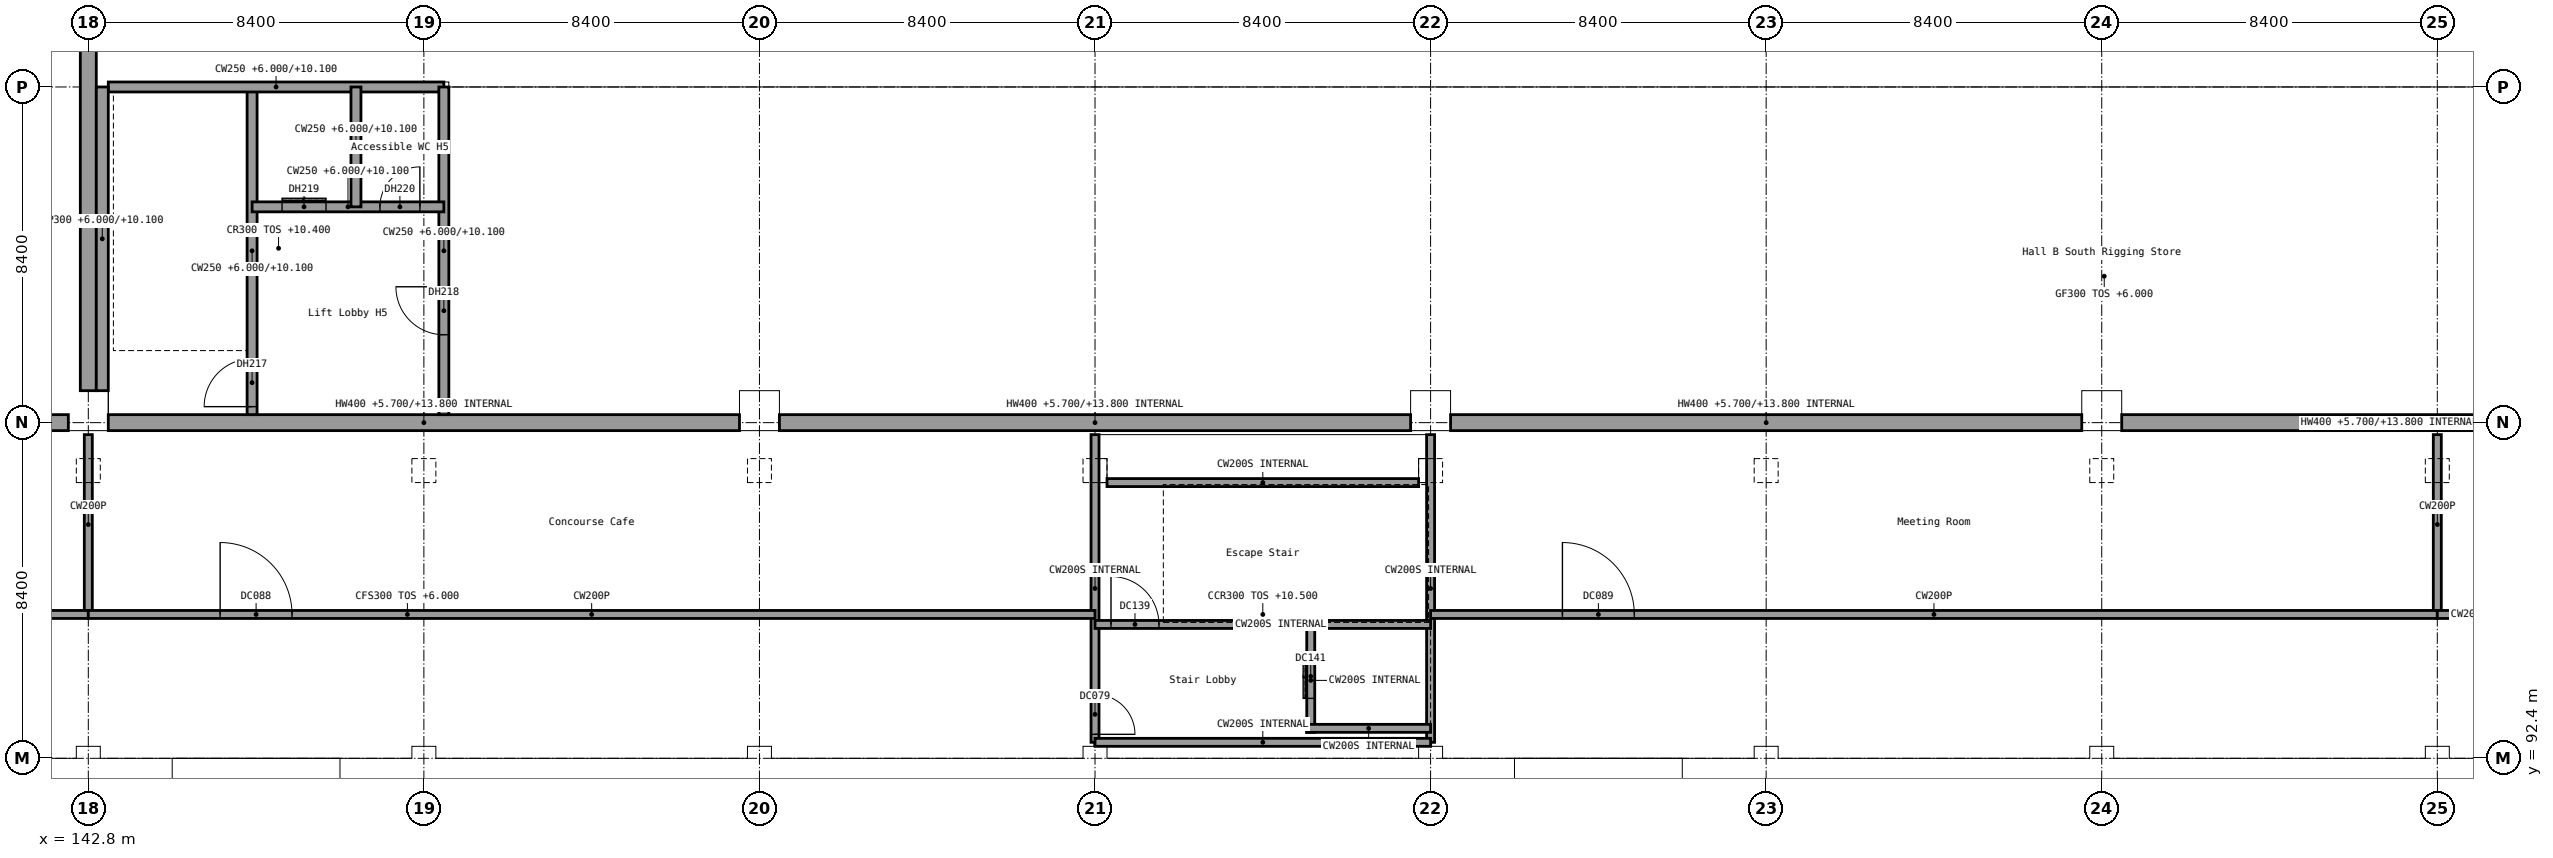
"""IFC4 building model, lengths in metres.
Left out: names, types, materials, properties, quantities, classifications, styles, units other than length and angle.
Written with IfcOpenShell. Run it as: python <this file> out.ifc"""

import sys

from ifc_helpers import new_model, si_unit, direction, frame, frame_2d, origin, origin_2d, place, context, subcontext, project, spatial, rectangle, extrude, element, fill, save


model = new_model("IFC4")
c1 = context("Model", 3, precision=1e-05, world=origin(), true_north=direction((0.0, 1.0)))
c2 = subcontext(c1, "Body", "Model", "MODEL_VIEW")
j1 = project(units=[si_unit("LENGTHUNIT", "METRE"), si_unit("PLANEANGLEUNIT", "RADIAN")], contexts=[c1])
p1 = place(None, origin())
s1 = spatial("IfcSite", under=j1, at=p1, CompositionType="ELEMENT")
p2 = place(p1, origin())
s2 = spatial("IfcBuilding", under=s1, at=p2, CompositionType="ELEMENT")
p3 = place(p2, frame((0.0, 0.0, 6.0)))
s3 = spatial("IfcBuildingStorey", under=s2, at=p3, CompositionType="ELEMENT", Elevation=6.0)
for number, where, z_axis, x_axis in (
    (1, (142.8, 100.8, 0.0), (0.0, 0.0, 1.0), (1.0, 0.0, 0.0)),
    (2, (159.6, 100.8, 0.0), (0.0, 0.0, 1.0), (1.0, 0.0, 0.0)),
    (3, (176.4, 100.8, 0.0), (0.0, 0.0, 1.0), (1.0, 0.0, 0.0)),
    (4, (193.2, 100.8, 0.0), (0.0, 0.0, 1.0), (1.0, 0.0, 0.0)),
):
    element("IfcColumn", number, at=place(p3, frame(where, z_axis=z_axis, x_axis=x_axis)), inside=s3, PredefinedType="COLUMN", context=c2, shape_type="SweptSolid", body=[
        extrude(rectangle(XDim=1.0, YDim=1.6, at=origin_2d()), origin(), (0.0, 0.0, 1.0), 4.5),
    ])
p4 = place(p3, frame((143.3, 100.8, -0.3), z_axis=(0.0, 0.0, 1.0), x_axis=(1.0, 0.0, 0.0)))
e5 = element("IfcWall", 5, at=p4, inside=s3, PredefinedType="STANDARD", context=c2, shape_type="SweptSolid", body=[
    extrude(rectangle(XDim=15.8, YDim=0.4, at=frame_2d((7.9, 0.0))), origin(), (0.0, 0.0, 1.0), 8.1),
])
p5 = place(p3, frame((160.1, 100.8, -0.3), z_axis=(0.0, 0.0, 1.0), x_axis=(1.0, 0.0, 0.0)))
e6 = element("IfcWall", 6, at=p5, inside=s3, PredefinedType="STANDARD", context=c2, shape_type="SweptSolid", body=[
    extrude(rectangle(XDim=15.8, YDim=0.4, at=frame_2d((7.9, 0.0))), origin(), (0.0, 0.0, 1.0), 8.1),
])
for number, where, z_axis, x_axis in (
    (7, (176.9, 100.8, -0.3), (0.0, 0.0, 1.0), (1.0, 0.0, 0.0)),
    (8, (193.7, 100.8, -0.3), (0.0, 0.0, 1.0), (1.0, 0.0, 0.0)),
):
    element("IfcWall", number, at=place(p3, frame(where, z_axis=z_axis, x_axis=x_axis)), inside=s3, PredefinedType="STANDARD", context=c2, shape_type="SweptSolid", body=[
        extrude(rectangle(XDim=15.8, YDim=0.4, at=frame_2d((7.9, 0.0))), origin(), (0.0, 0.0, 1.0), 8.1),
    ])
p6 = place(p3, frame((142.8, 101.6, 0.0), z_axis=(0.0, 0.0, 1.0), x_axis=(0.0, 1.0, 0.0)))
e9 = element("IfcWall", 9, at=p6, inside=s3, PredefinedType="SHEAR", context=c2, shape_type="SweptSolid", body=[
    extrude(rectangle(XDim=99.2, YDim=0.4, at=frame_2d((49.6, 0.0))), origin(), (0.0, 0.0, 1.0), 5.0),
])
p7 = place(p3, frame((126.5, 100.8, -0.3), z_axis=(0.0, 0.0, 1.0), x_axis=(1.0, 0.0, 0.0)))
e10 = element("IfcWall", 10, at=p7, inside=s3, PredefinedType="SHEAR", context=c2, shape_type="SweptSolid", body=[
    extrude(rectangle(XDim=15.8, YDim=0.4, at=frame_2d((7.9, 0.0))), origin(), (0.0, 0.0, 1.0), 4.9),
])
p8 = place(p7, frame((6.35, 0.0, 0.3)))
e11 = element("IfcOpeningElement", 11, at=p8, cuts=e10, PredefinedType="OPENING", context=c2, shape_type="SweptSolid", body=[
    extrude(rectangle(XDim=1.2, YDim=2.1, at=frame_2d((0.6, 1.05))), frame((0.0, 0.2, 0.0), z_axis=(0.0, -1.0, 0.0), x_axis=(1.0, 0.0, 0.0)), (0.0, 0.0, 1.0), 0.4),
])
p9 = place(p3, frame((146.9, 101.0, 0.0), z_axis=(0.0, 0.0, 1.0), x_axis=(0.0, 1.0, 0.0)))
e12 = element("IfcWall", 12, at=p9, inside=s3, PredefinedType="SHEAR", context=c2, shape_type="SweptSolid", body=[
    extrude(rectangle(XDim=8.2, YDim=0.25, at=frame_2d((4.1, 0.0))), origin(), (0.0, 0.0, 1.0), 4.1),
])
p10 = place(p9, frame((0.2, 0.0, 0.0)))
e13 = element("IfcOpeningElement", 13, at=p10, cuts=e12, PredefinedType="OPENING", context=c2, shape_type="SweptSolid", body=[
    extrude(rectangle(XDim=1.2, YDim=2.1, at=frame_2d((0.6, 1.05))), frame((0.0, 0.125, 0.0), z_axis=(0.0, -1.0, 0.0), x_axis=(1.0, 0.0, 0.0)), (0.0, 0.0, 1.0), 0.25),
])
p11 = place(p3, frame((143.3, 109.2, 0.0), z_axis=(0.0, 0.0, 1.0), x_axis=(1.0, 0.0, 0.0)))
e14 = element("IfcWall", 14, at=p11, inside=s3, PredefinedType="SHEAR", context=c2, shape_type="SweptSolid", body=[
    extrude(rectangle(XDim=8.4, YDim=0.25, at=frame_2d((4.2, 0.0))), origin(), (0.0, 0.0, 1.0), 4.1),
])
p12 = place(p3, frame((151.7, 101.0, 0.0), z_axis=(0.0, 0.0, 1.0), x_axis=(0.0, 1.0, 0.0)))
e15 = element("IfcWall", 15, at=p12, inside=s3, PredefinedType="SHEAR", context=c2, shape_type="SweptSolid", body=[
    extrude(rectangle(XDim=8.2, YDim=0.25, at=frame_2d((4.1, 0.0))), origin(), (0.0, 0.0, 1.0), 4.1),
])
p13 = place(p12, frame((2.0, 0.0, 0.0)))
e16 = element("IfcOpeningElement", 16, at=p13, cuts=e15, PredefinedType="OPENING", context=c2, shape_type="SweptSolid", body=[
    extrude(rectangle(XDim=1.2, YDim=2.1, at=frame_2d((0.6, 1.05))), frame((0.0, 0.125, 0.0), z_axis=(0.0, -1.0, 0.0), x_axis=(1.0, 0.0, 0.0)), (0.0, 0.0, 1.0), 0.25),
])
p14 = place(p3, frame((146.9, 106.2, 0.0), z_axis=(0.0, 0.0, 1.0), x_axis=(1.0, 0.0, 0.0)))
e17 = element("IfcWall", 17, at=p14, inside=s3, PredefinedType="SHEAR", context=c2, shape_type="SweptSolid", body=[
    extrude(rectangle(XDim=4.8, YDim=0.25, at=frame_2d((2.4, 0.0))), origin(), (0.0, 0.0, 1.0), 4.1),
])
p15 = place(p14, frame((0.75, 0.0, 0.0)))
e18 = element("IfcOpeningElement", 18, at=p15, cuts=e17, PredefinedType="OPENING", context=c2, shape_type="SweptSolid", body=[
    extrude(rectangle(XDim=1.1, YDim=2.1, at=frame_2d((0.55, 1.05))), frame((0.0, 0.125, 0.0), z_axis=(0.0, -1.0, 0.0), x_axis=(1.0, 0.0, 0.0)), (0.0, 0.0, 1.0), 0.25),
])
p16 = place(p14, frame((3.2, 0.0, 0.0)))
e19 = element("IfcOpeningElement", 19, at=p16, cuts=e17, PredefinedType="OPENING", context=c2, shape_type="SweptSolid", body=[
    extrude(rectangle(XDim=1.0, YDim=2.1, at=frame_2d((0.5, 1.05))), frame((0.0, 0.125, 0.0), z_axis=(0.0, -1.0, 0.0), x_axis=(1.0, 0.0, 0.0)), (0.0, 0.0, 1.0), 0.25),
])
p17 = place(p3, frame((149.5, 106.2, 0.0), z_axis=(0.0, 0.0, 1.0), x_axis=(0.0, 1.0, 0.0)))
e20 = element("IfcWall", 20, at=p17, inside=s3, PredefinedType="SHEAR", context=c2, shape_type="SweptSolid", body=[
    extrude(rectangle(XDim=3.0, YDim=0.25, at=frame_2d((1.5, 0.0))), origin(), (0.0, 0.0, 1.0), 4.1),
])
p18 = place(p3, frame((143.15, 101.6, 0.0), z_axis=(0.0, 0.0, 1.0), x_axis=(0.0, 1.0, 0.0)))
e21 = element("IfcWall", 21, at=p18, inside=s3, PredefinedType="SHEAR", context=c2, shape_type="SweptSolid", body=[
    extrude(rectangle(XDim=7.6, YDim=0.3, at=frame_2d((3.8, 0.0))), origin(), (0.0, 0.0, 1.0), 4.1),
])
for number, where, z_axis, x_axis in (
    (22, (142.8, 99.6, 0.0), (0.0, 0.0, 1.0), (1.0, 0.0, 0.0)),
    (23, (151.2, 99.6, 0.0), (0.0, 0.0, 1.0), (1.0, 0.0, 0.0)),
    (24, (159.6, 99.6, 0.0), (0.0, 0.0, 1.0), (1.0, 0.0, 0.0)),
    (25, (168.0, 99.6, 0.0), (0.0, 0.0, 1.0), (1.0, 0.0, 0.0)),
    (26, (176.4, 99.6, 0.0), (0.0, 0.0, 1.0), (1.0, 0.0, 0.0)),
    (27, (184.8, 99.6, 0.0), (0.0, 0.0, 1.0), (1.0, 0.0, 0.0)),
    (28, (193.2, 99.6, 0.0), (0.0, 0.0, 1.0), (1.0, 0.0, 0.0)),
    (29, (201.6, 99.6, 0.0), (0.0, 0.0, 1.0), (1.0, 0.0, 0.0)),
):
    element("IfcColumn", number, at=place(p3, frame(where, z_axis=z_axis, x_axis=x_axis)), inside=s3, PredefinedType="COLUMN", context=c2, shape_type="SweptSolid", body=[
        extrude(rectangle(XDim=0.6, YDim=0.6, at=origin_2d()), origin(), (0.0, 0.0, 1.0), 4.5),
    ])
p19 = place(p3, frame((142.8, 100.5, 0.0), z_axis=(0.0, 0.0, 1.0), x_axis=(0.0, -1.0, 0.0)))
e30 = element("IfcWall", 30, at=p19, inside=s3, PredefinedType="PARTITIONING", context=c2, shape_type="SweptSolid", body=[
    extrude(rectangle(XDim=4.5, YDim=0.2, at=frame_2d((2.25, 0.0))), origin(), (0.0, 0.0, 1.0), 4.5),
])
p20 = place(p3, frame((168.0, 100.5, 0.0), z_axis=(0.0, 0.0, 1.0), x_axis=(0.0, -1.0, 0.0)))
e31 = element("IfcWall", 31, at=p20, inside=s3, PredefinedType="SOLIDWALL", context=c2, shape_type="SweptSolid", body=[
    extrude(rectangle(XDim=7.7, YDim=0.2, at=frame_2d((3.85, 0.0))), origin(), (0.0, 0.0, 1.0), 4.2),
])
p21 = place(p20, frame((6.5, 0.0, 0.0)))
e32 = element("IfcOpeningElement", 32, at=p21, cuts=e31, PredefinedType="OPENING", context=c2, shape_type="SweptSolid", body=[
    extrude(rectangle(XDim=1.0, YDim=2.4, at=frame_2d((0.5, 1.2))), frame((0.0, 0.1, 0.0), z_axis=(0.0, -1.0, 0.0), x_axis=(1.0, 0.0, 0.0)), (0.0, 0.0, 1.0), 0.2),
])
p22 = place(p3, frame((176.4, 100.5, 0.0), z_axis=(0.0, 0.0, 1.0), x_axis=(0.0, -1.0, 0.0)))
e33 = element("IfcWall", 33, at=p22, inside=s3, PredefinedType="SOLIDWALL", context=c2, shape_type="SweptSolid", body=[
    extrude(rectangle(XDim=7.7, YDim=0.2, at=frame_2d((3.85, 0.0))), origin(), (0.0, 0.0, 1.0), 4.2),
])
p23 = place(p3, frame((201.6, 100.5, 0.0), z_axis=(0.0, 0.0, 1.0), x_axis=(0.0, -1.0, 0.0)))
e34 = element("IfcWall", 34, at=p23, inside=s3, PredefinedType="PARTITIONING", context=c2, shape_type="SweptSolid", body=[
    extrude(rectangle(XDim=4.5, YDim=0.2, at=frame_2d((2.25, 0.0))), origin(), (0.0, 0.0, 1.0), 4.5),
])
p24 = place(p3, frame((126.0, 96.0, 0.0), z_axis=(0.0, 0.0, 1.0), x_axis=(1.0, 0.0, 0.0)))
e35 = element("IfcWall", 35, at=p24, inside=s3, PredefinedType="PARTITIONING", context=c2, shape_type="SweptSolid", body=[
    extrude(rectangle(XDim=16.8, YDim=0.2, at=frame_2d((8.4, 0.0))), origin(), (0.0, 0.0, 1.0), 4.5),
])
p25 = place(p24, frame((3.3, 0.0, 0.0)))
e36 = element("IfcOpeningElement", 36, at=p25, cuts=e35, PredefinedType="OPENING", context=c2, shape_type="SweptSolid", body=[
    extrude(rectangle(XDim=1.8, YDim=2.4, at=frame_2d((0.9, 1.2))), frame((0.0, 0.1, 0.0), z_axis=(0.0, -1.0, 0.0), x_axis=(1.0, 0.0, 0.0)), (0.0, 0.0, 1.0), 0.2),
])
p26 = place(p3, frame((142.8, 96.0, 0.0), z_axis=(0.0, 0.0, 1.0), x_axis=(1.0, 0.0, 0.0)))
e37 = element("IfcWall", 37, at=p26, inside=s3, PredefinedType="PARTITIONING", context=c2, shape_type="SweptSolid", body=[
    extrude(rectangle(XDim=25.2, YDim=0.2, at=frame_2d((12.6, 0.0))), origin(), (0.0, 0.0, 1.0), 4.5),
])
p27 = place(p26, frame((3.3, 0.0, 0.0)))
e38 = element("IfcOpeningElement", 38, at=p27, cuts=e37, PredefinedType="OPENING", context=c2, shape_type="SweptSolid", body=[
    extrude(rectangle(XDim=1.8, YDim=2.4, at=frame_2d((0.9, 1.2))), frame((0.0, 0.1, 0.0), z_axis=(0.0, -1.0, 0.0), x_axis=(1.0, 0.0, 0.0)), (0.0, 0.0, 1.0), 0.2),
])
p28 = place(p3, frame((176.4, 96.0, 0.0), z_axis=(0.0, 0.0, 1.0), x_axis=(1.0, 0.0, 0.0)))
e39 = element("IfcWall", 39, at=p28, inside=s3, PredefinedType="PARTITIONING", context=c2, shape_type="SweptSolid", body=[
    extrude(rectangle(XDim=25.2, YDim=0.2, at=frame_2d((12.6, 0.0))), origin(), (0.0, 0.0, 1.0), 4.5),
])
p29 = place(p28, frame((3.3, 0.0, 0.0)))
e40 = element("IfcOpeningElement", 40, at=p29, cuts=e39, PredefinedType="OPENING", context=c2, shape_type="SweptSolid", body=[
    extrude(rectangle(XDim=1.8, YDim=2.4, at=frame_2d((0.9, 1.2))), frame((0.0, 0.1, 0.0), z_axis=(0.0, -1.0, 0.0), x_axis=(1.0, 0.0, 0.0)), (0.0, 0.0, 1.0), 0.2),
])
p30 = place(p3, frame((201.6, 96.0, 0.0), z_axis=(0.0, 0.0, 1.0), x_axis=(1.0, 0.0, 0.0)))
e41 = element("IfcWall", 41, at=p30, inside=s3, PredefinedType="PARTITIONING", context=c2, shape_type="SweptSolid", body=[
    extrude(rectangle(XDim=16.8, YDim=0.2, at=frame_2d((8.4, 0.0))), origin(), (0.0, 0.0, 1.0), 4.5),
])
p31 = place(p30, frame((3.3, 0.0, 0.0)))
e42 = element("IfcOpeningElement", 42, at=p31, cuts=e41, PredefinedType="OPENING", context=c2, shape_type="SweptSolid", body=[
    extrude(rectangle(XDim=1.8, YDim=2.4, at=frame_2d((0.9, 1.2))), frame((0.0, 0.1, 0.0), z_axis=(0.0, -1.0, 0.0), x_axis=(1.0, 0.0, 0.0)), (0.0, 0.0, 1.0), 0.2),
])
p32 = place(p3, frame((168.0, 92.8, 0.0), z_axis=(0.0, 0.0, 1.0), x_axis=(1.0, 0.0, 0.0)))
e43 = element("IfcWall", 43, at=p32, inside=s3, PredefinedType="SOLIDWALL", context=c2, shape_type="SweptSolid", body=[
    extrude(rectangle(XDim=8.4, YDim=0.2, at=frame_2d((4.2, 0.0))), origin(), (0.0, 0.0, 1.0), 4.2),
])
p33 = place(p3, frame((168.3, 99.3, 0.0), z_axis=(0.0, 0.0, 1.0), x_axis=(1.0, 0.0, 0.0)))
e44 = element("IfcWall", 44, at=p33, inside=s3, PredefinedType="SOLIDWALL", context=c2, shape_type="SweptSolid", body=[
    extrude(rectangle(XDim=7.8, YDim=0.2, at=frame_2d((3.9, 0.0))), origin(), (0.0, 0.0, 1.0), 4.2),
])
p34 = place(p3, frame((168.0, 95.75, 0.0), z_axis=(0.0, 0.0, 1.0), x_axis=(1.0, 0.0, 0.0)))
e45 = element("IfcWall", 45, at=p34, inside=s3, PredefinedType="SOLIDWALL", context=c2, shape_type="SweptSolid", body=[
    extrude(rectangle(XDim=8.4, YDim=0.2, at=frame_2d((4.2, 0.0))), origin(), (0.0, 0.0, 1.0), 4.2),
])
p35 = place(p34, frame((0.4, 0.0, 0.0)))
e46 = element("IfcOpeningElement", 46, at=p35, cuts=e45, PredefinedType="OPENING", context=c2, shape_type="SweptSolid", body=[
    extrude(rectangle(XDim=1.2, YDim=2.4, at=frame_2d((0.6, 1.2))), frame((0.0, 0.1, 0.0), z_axis=(0.0, -1.0, 0.0), x_axis=(1.0, 0.0, 0.0)), (0.0, 0.0, 1.0), 0.2),
])
p36 = place(p3, frame((173.4, 93.05, 0.0), z_axis=(0.0, 0.0, 1.0), x_axis=(0.0, 1.0, 0.0)))
e47 = element("IfcWall", 47, at=p36, inside=s3, PredefinedType="SOLIDWALL", context=c2, shape_type="SweptSolid", body=[
    extrude(rectangle(XDim=2.6, YDim=0.2, at=frame_2d((1.3, 0.0))), origin(), (0.0, 0.0, 1.0), 4.2),
])
p37 = place(p36, frame((0.85, 0.0, 0.0)))
e48 = element("IfcOpeningElement", 48, at=p37, cuts=e47, PredefinedType="OPENING", context=c2, shape_type="SweptSolid", body=[
    extrude(rectangle(XDim=1.1, YDim=2.1, at=frame_2d((0.55, 1.05))), frame((0.0, 0.1, 0.0), z_axis=(0.0, -1.0, 0.0), x_axis=(1.0, 0.0, 0.0)), (0.0, 0.0, 1.0), 0.2),
])
p38 = place(p3, frame((173.3, 93.15, 0.0), z_axis=(0.0, 0.0, 1.0), x_axis=(1.0, 0.0, 0.0)))
e49 = element("IfcWall", 49, at=p38, inside=s3, PredefinedType="SOLIDWALL", context=c2, shape_type="SweptSolid", body=[
    extrude(rectangle(XDim=3.1, YDim=0.2, at=frame_2d((1.55, 0.0))), origin(), (0.0, 0.0, 1.0), 4.2),
])
p39 = place(p10, origin())
e50 = element("IfcDoor", 50, at=p39, inside=s3, OperationType="SINGLE_SWING_LEFT", PredefinedType="DOOR", context=c2, shape_type="SweptSolid", body=[
    extrude(rectangle(XDim=1.2, YDim=2.1, at=frame_2d((0.6, 1.05))), frame((0.0, 0.025, 0.0), z_axis=(0.0, -1.0, 0.0), x_axis=(1.0, 0.0, 0.0)), (0.0, 0.0, 1.0), 0.05),
])
fill(e13, e50)
p40 = place(p13, origin())
e51 = element("IfcDoor", 51, at=p40, inside=s3, OperationType="SINGLE_SWING_LEFT", PredefinedType="DOOR", context=c2, shape_type="SweptSolid", body=[
    extrude(rectangle(XDim=1.2, YDim=2.1, at=frame_2d((0.6, 1.05))), frame((0.0, 0.025, 0.0), z_axis=(0.0, -1.0, 0.0), x_axis=(1.0, 0.0, 0.0)), (0.0, 0.0, 1.0), 0.05),
])
fill(e16, e51)
p41 = place(p15, origin())
e52 = element("IfcDoor", 52, at=p41, inside=s3, OperationType="DOUBLE_DOOR_SLIDING", PredefinedType="DOOR", context=c2, shape_type="SweptSolid", body=[
    extrude(rectangle(XDim=1.1, YDim=2.1, at=frame_2d((0.55, 1.05))), frame((0.0, 0.025, 0.0), z_axis=(0.0, -1.0, 0.0), x_axis=(1.0, 0.0, 0.0)), (0.0, 0.0, 1.0), 0.05),
])
fill(e18, e52)
p42 = place(p16, origin())
e53 = element("IfcDoor", 53, at=p42, inside=s3, OperationType="SINGLE_SWING_RIGHT", PredefinedType="DOOR", context=c2, shape_type="SweptSolid", body=[
    extrude(rectangle(XDim=1.0, YDim=2.1, at=frame_2d((0.5, 1.05))), frame((0.0, 0.025, 0.0), z_axis=(0.0, -1.0, 0.0), x_axis=(1.0, 0.0, 0.0)), (0.0, 0.0, 1.0), 0.05),
])
fill(e19, e53)
p43 = place(p21, origin())
e54 = element("IfcDoor", 54, at=p43, inside=s3, OperationType="SINGLE_SWING_RIGHT", PredefinedType="DOOR", context=c2, shape_type="SweptSolid", body=[
    extrude(rectangle(XDim=1.0, YDim=2.4, at=frame_2d((0.5, 1.2))), frame((0.0, 0.025, 0.0), z_axis=(0.0, -1.0, 0.0), x_axis=(1.0, 0.0, 0.0)), (0.0, 0.0, 1.0), 0.05),
])
fill(e32, e54)
p44 = place(p27, origin())
e55 = element("IfcDoor", 55, at=p44, inside=s3, OperationType="DOUBLE_DOOR_DOUBLE_SWING", PredefinedType="DOOR", context=c2, shape_type="SweptSolid", body=[
    extrude(rectangle(XDim=1.8, YDim=2.4, at=frame_2d((0.9, 1.2))), frame((0.0, 0.025, 0.0), z_axis=(0.0, -1.0, 0.0), x_axis=(1.0, 0.0, 0.0)), (0.0, 0.0, 1.0), 0.05),
])
fill(e38, e55)
p45 = place(p29, origin())
e56 = element("IfcDoor", 56, at=p45, inside=s3, OperationType="DOUBLE_DOOR_DOUBLE_SWING", PredefinedType="DOOR", context=c2, shape_type="SweptSolid", body=[
    extrude(rectangle(XDim=1.8, YDim=2.4, at=frame_2d((0.9, 1.2))), frame((0.0, 0.025, 0.0), z_axis=(0.0, -1.0, 0.0), x_axis=(1.0, 0.0, 0.0)), (0.0, 0.0, 1.0), 0.05),
])
fill(e40, e56)
p46 = place(p35, origin())
e57 = element("IfcDoor", 57, at=p46, inside=s3, OperationType="SINGLE_SWING_LEFT", PredefinedType="DOOR", context=c2, shape_type="SweptSolid", body=[
    extrude(rectangle(XDim=1.2, YDim=2.4, at=frame_2d((0.6, 1.2))), frame((0.0, 0.025, 0.0), z_axis=(0.0, -1.0, 0.0), x_axis=(1.0, 0.0, 0.0)), (0.0, 0.0, 1.0), 0.05),
])
fill(e46, e57)
p47 = place(p37, origin())
e58 = element("IfcDoor", 58, at=p47, inside=s3, OperationType="DOUBLE_DOOR_SLIDING", PredefinedType="DOOR", context=c2, shape_type="SweptSolid", body=[
    extrude(rectangle(XDim=1.1, YDim=2.1, at=frame_2d((0.55, 1.05))), frame((0.0, 0.025, 0.0), z_axis=(0.0, -1.0, 0.0), x_axis=(1.0, 0.0, 0.0)), (0.0, 0.0, 1.0), 0.05),
])
fill(e48, e58)
save(model, sys.argv[1])
